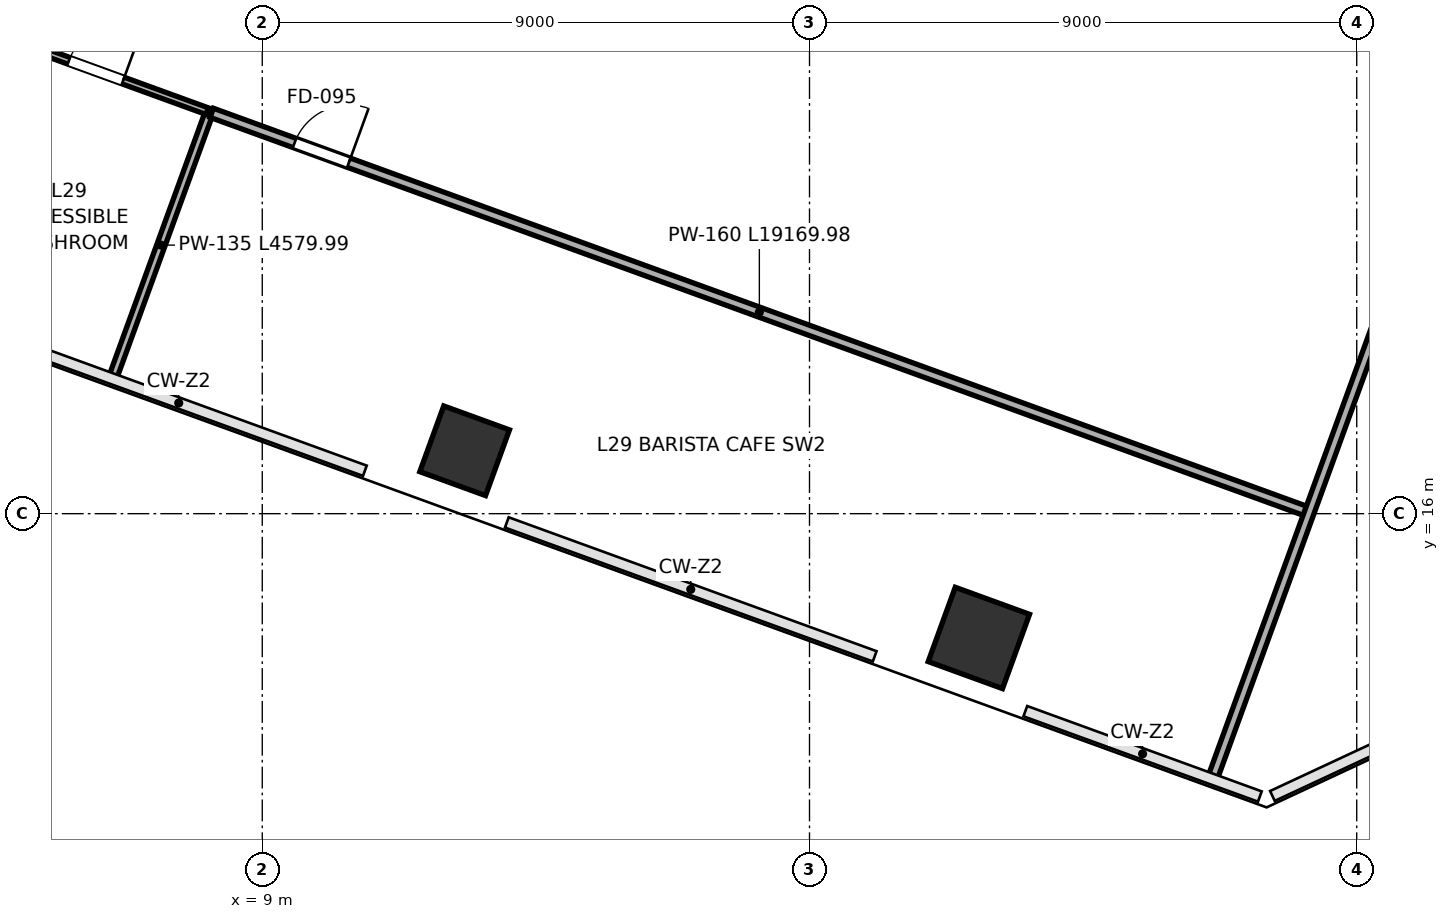
"""IFC4 building model, lengths in metres.
Left out: names, types, materials, properties, quantities, classifications, styles, units other than length and angle.
Written with IfcOpenShell. Run it as: python <this file> out.ifc"""

import sys

from ifc_helpers import new_model, si_unit, direction, frame, frame_2d, origin, origin_2d, place, context, subcontext, project, spatial, rectangle, extrude, clip, halfspace, source, transform, mapped, element, fill, save


model = new_model("IFC4")
c1 = context("Model", 3, precision=1e-05, world=origin(), true_north=direction((0.0, 1.0)))
c2 = subcontext(c1, "Body", "Model", "MODEL_VIEW")
j1 = project(units=[si_unit("LENGTHUNIT", "METRE"), si_unit("PLANEANGLEUNIT", "RADIAN")], contexts=[c1])
p1 = place(None, origin())
s1 = spatial("IfcSite", under=j1, at=p1, CompositionType="ELEMENT")
p2 = place(p1, origin())
s2 = spatial("IfcBuilding", under=s1, at=p2, CompositionType="ELEMENT")
p3 = place(p2, frame((0.0, 0.0, 133.0)))
s3 = spatial("IfcBuildingStorey", under=s2, at=p3, CompositionType="ELEMENT", Elevation=133.0)
p4 = place(p3, frame((12.328, 17.034, 0.0), z_axis=(-0.076934640487, 0.048279526084, 0.995866531446), x_axis=(0.787992689397, 0.614900375793, 0.031065242737)))
e1 = element("IfcColumn", 1, at=p4, inside=s3, PredefinedType="COLUMN", context=c2, shape_type="Clipping", body=[
    clip(clip(extrude(rectangle(XDim=1.15, YDim=1.15, at=origin_2d()), origin(), (0.0, 0.0, 1.0), 4.217), halfspace(frame((0.0, 0.0, 0.068), z_axis=(0.0, 0.0, -1.0), x_axis=(1.0, 0.0, 0.0)), False)), halfspace(frame((0.0, 0.0, 4.149), z_axis=(0.0, 0.0, 1.0), x_axis=(1.0, 0.0, 0.0)), False)),
])
p5 = place(p3, frame((20.786, 13.956, 0.0), z_axis=(-0.093294861865, 0.004687893183, 0.995627486768), x_axis=(0.387253885396, 0.92141938929, 0.031948979406)))
e2 = element("IfcColumn", 2, at=p5, inside=s3, PredefinedType="COLUMN", context=c2, shape_type="Clipping", body=[
    clip(clip(extrude(rectangle(XDim=1.3, YDim=1.3, at=origin_2d()), origin(), (0.0, 0.0, 1.0), 4.219), halfspace(frame((0.0, 0.0, 0.079), z_axis=(0.0, 0.0, -1.0), x_axis=(1.0, 0.0, 0.0)), False)), halfspace(frame((0.0, 0.0, 4.14), z_axis=(0.0, 0.0, 1.0), x_axis=(1.0, 0.0, 0.0)), False)),
])
p6 = place(p3, frame((6.551, 18.265, 0.0), z_axis=(0.0, 0.0, 1.0), x_axis=(0.342016975922, 0.939693773621, 0.0)))
e3 = element("IfcWall", 3, at=p6, inside=s3, PredefinedType="PARTITIONING", context=c2, shape_type="SweptSolid", body=[
    extrude(rectangle(XDim=4.58, YDim=0.135, at=frame_2d((2.29, 0.0))), origin(), (0.0, 0.0, 1.0), 3.195),
])
p7 = place(p3, frame((1.121, 25.157, 0.0), z_axis=(0.0, 0.0, 1.0), x_axis=(0.939692513883, -0.342020437038, 0.0)))
e4 = element("IfcWall", 4, at=p7, inside=s3, PredefinedType="PARTITIONING", context=c2, shape_type="SweptSolid", body=[
    extrude(rectangle(XDim=7.42, YDim=0.115, at=frame_2d((3.71, 0.0))), origin(), (0.0, 0.0, 1.0), 3.96),
])
p8 = place(p7, frame((2.9, 0.0, 0.0)))
e5 = element("IfcOpeningElement", 5, at=p8, cuts=e4, PredefinedType="OPENING", context=c2, shape_type="SweptSolid", body=[
    extrude(rectangle(XDim=0.9, YDim=2.15, at=frame_2d((0.45, 1.075))), frame((0.0, 0.067, 0.0), z_axis=(0.0, -1.0, 0.0), x_axis=(1.0, 0.0, 0.0)), (0.0, 0.0, 1.0), 0.135),
])
p9 = place(p7, frame((5.0, 0.0, 0.0)))
e6 = element("IfcOpeningElement", 6, at=p9, cuts=e4, PredefinedType="OPENING", context=c2, shape_type="SweptSolid", body=[
    extrude(rectangle(XDim=0.95, YDim=2.15, at=frame_2d((0.475, 1.075))), frame((0.0, 0.067, 0.0), z_axis=(0.0, -1.0, 0.0), x_axis=(1.0, 0.0, 0.0)), (0.0, 0.0, 1.0), 0.135),
])
p10 = place(p3, frame((8.168, 22.592, 0.0), z_axis=(0.0, 0.0, 1.0), x_axis=(0.939694846349, -0.342014028579, 0.0)))
e7 = element("IfcWall", 7, at=p10, inside=s3, PredefinedType="PARTITIONING", context=c2, shape_type="SweptSolid", body=[
    extrude(rectangle(XDim=19.17, YDim=0.16, at=frame_2d((9.585, 0.0))), origin(), (0.0, 0.0, 1.0), 3.96),
])
p11 = place(p10, frame((1.45, 0.0, 0.0)))
e8 = element("IfcOpeningElement", 8, at=p11, cuts=e7, PredefinedType="OPENING", context=c2, shape_type="SweptSolid", body=[
    extrude(rectangle(XDim=0.95, YDim=2.15, at=frame_2d((0.475, 1.075))), frame((0.0, 0.09, 0.0), z_axis=(0.0, -1.0, 0.0), x_axis=(1.0, 0.0, 0.0)), (0.0, 0.0, 1.0), 0.18),
])
p12 = place(p3, frame((24.64, 11.681, 0.0), z_axis=(0.0, 0.0, 1.0), x_axis=(0.342014151498, 0.939694801611, 0.0)))
e9 = element("IfcWall", 9, at=p12, inside=s3, PredefinedType="PARTITIONING", context=c2, shape_type="SweptSolid", body=[
    extrude(rectangle(XDim=20.68, YDim=0.16, at=frame_2d((10.34, 0.0))), origin(), (0.0, 0.0, 1.0), 3.96),
])
m1 = source(origin(), c2, "Body", "SweptSolid", [
    extrude(rectangle(XDim=0.95, YDim=2.15, at=frame_2d((0.475, 1.075))), frame((0.0, 0.025, 0.0), z_axis=(0.0, -1.0, 0.0), x_axis=(1.0, 0.0, 0.0)), (0.0, 0.0, 1.0), 0.05),
])
p13 = place(p9, origin())
e10 = element("IfcDoor", 10, at=p13, inside=s3, OperationType="SINGLE_SWING_RIGHT", PredefinedType="DOOR", context=c2, shape_type="MappedRepresentation", body=[
    mapped(m1, transform((0.0, 0.0, 0.0), scale=1.0)),
])
fill(e6, e10)
m2 = source(origin(), c2, "Body", "SweptSolid", [
    extrude(rectangle(XDim=0.95, YDim=2.15, at=frame_2d((0.475, 1.075))), frame((0.0, 0.025, 0.0), z_axis=(0.0, -1.0, 0.0), x_axis=(1.0, 0.0, 0.0)), (0.0, 0.0, 1.0), 0.05),
])
p14 = place(p11, origin())
e11 = element("IfcDoor", 11, at=p14, inside=s3, OperationType="SINGLE_SWING_RIGHT", PredefinedType="DOOR", context=c2, shape_type="MappedRepresentation", body=[
    mapped(m2, transform((0.0, 0.0, 0.0), scale=1.0)),
])
fill(e8, e11)
save(model, sys.argv[1])
